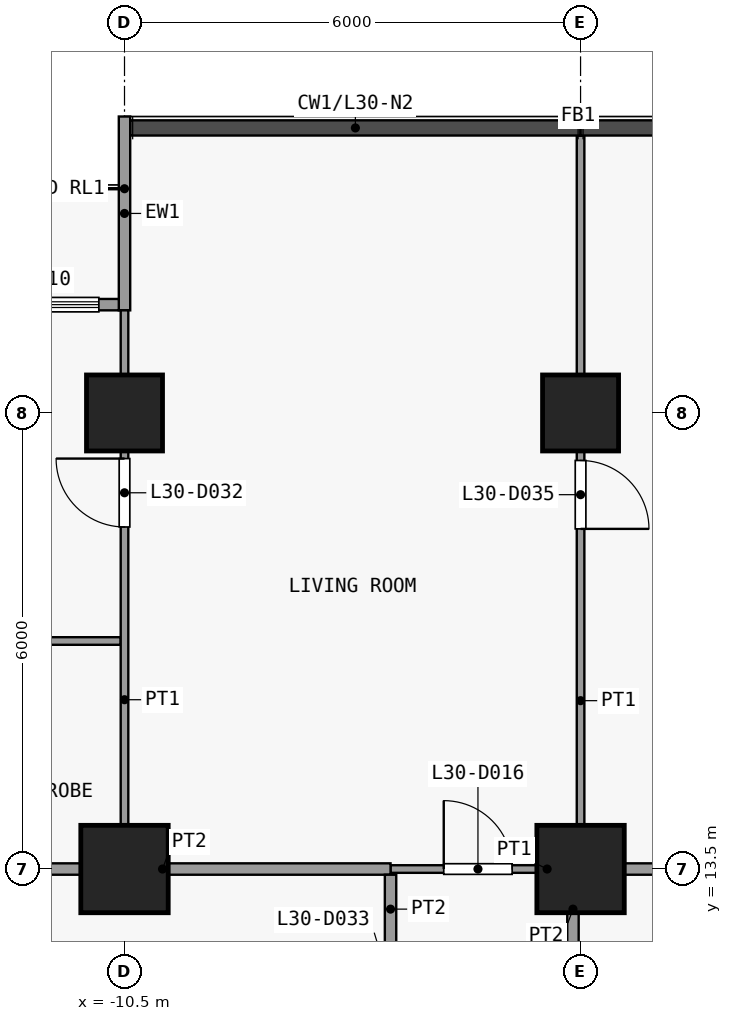
"""IFC4 building model, lengths in metres.
Left out: names, types, materials, properties, quantities, classifications, styles, units other than length and angle.
Written with IfcOpenShell. Run it as: python <this file> out.ifc"""

import sys

from ifc_helpers import new_model, si_unit, direction, frame, frame_2d, origin, origin_2d, place, context, subcontext, project, spatial, rectangle, extrude, element, fill, save


model = new_model("IFC4")
c1 = context("Model", 3, precision=1e-05, world=origin(), true_north=direction((0.0, 1.0)))
c2 = subcontext(c1, "Body", "Model", "MODEL_VIEW")
j1 = project(units=[si_unit("LENGTHUNIT", "METRE"), si_unit("PLANEANGLEUNIT", "RADIAN")], contexts=[c1])
p1 = place(None, origin())
s1 = spatial("IfcSite", under=j1, at=p1, CompositionType="ELEMENT")
p2 = place(p1, origin())
s2 = spatial("IfcBuilding", under=s1, at=p2, CompositionType="ELEMENT")
p3 = place(p2, frame((0.0, 0.0, 120.7)))
s3 = spatial("IfcBuildingStorey", under=s2, at=p3, CompositionType="ELEMENT", Elevation=120.7)
p4 = place(p3, frame((-10.5, 13.5, 0.0), z_axis=(0.0, 0.0, 1.0), x_axis=(1.0, 0.0, 0.0)))
e1 = element("IfcColumn", 1, at=p4, inside=s3, PredefinedType="COLUMN", context=c2, shape_type="SweptSolid", body=[
    extrude(rectangle(XDim=1.15, YDim=1.15, at=origin_2d()), origin(), (0.0, 0.0, 1.0), 3.6),
])
p5 = place(p3, frame((-10.5, 19.5, 0.0), z_axis=(0.0, 0.0, 1.0), x_axis=(1.0, 0.0, 0.0)))
e2 = element("IfcColumn", 2, at=p5, inside=s3, PredefinedType="COLUMN", context=c2, shape_type="SweptSolid", body=[
    extrude(rectangle(XDim=1.0, YDim=1.0, at=origin_2d()), origin(), (0.0, 0.0, 1.0), 3.6),
])
p6 = place(p3, frame((-4.5, 13.5, 0.0), z_axis=(0.0, 0.0, 1.0), x_axis=(1.0, 0.0, 0.0)))
e3 = element("IfcColumn", 3, at=p6, inside=s3, PredefinedType="COLUMN", context=c2, shape_type="SweptSolid", body=[
    extrude(rectangle(XDim=1.15, YDim=1.15, at=origin_2d()), origin(), (0.0, 0.0, 1.0), 3.6),
])
p7 = place(p3, frame((-4.5, 19.5, 0.0), z_axis=(0.0, 0.0, 1.0), x_axis=(1.0, 0.0, 0.0)))
e4 = element("IfcColumn", 4, at=p7, inside=s3, PredefinedType="COLUMN", context=c2, shape_type="SweptSolid", body=[
    extrude(rectangle(XDim=1.0, YDim=1.0, at=origin_2d()), origin(), (0.0, 0.0, 1.0), 3.6),
])
p8 = place(p3, frame((-10.5, 20.85, 0.0), z_axis=(0.0, 0.0, 1.0), x_axis=(0.0, 1.0, 0.0)))
e5 = element("IfcWall", 5, at=p8, inside=s3, PredefinedType="SOLIDWALL", context=c2, shape_type="SweptSolid", body=[
    extrude(rectangle(XDim=2.55, YDim=0.15, at=frame_2d((1.275, 0.0))), origin(), (0.0, 0.0, 1.0), 3.3),
])
p9 = place(p3, frame((-16.425, 20.925, 0.0), z_axis=(0.0, 0.0, 1.0), x_axis=(1.0, 0.0, 0.0)))
e6 = element("IfcWall", 6, at=p9, inside=s3, PredefinedType="SOLIDWALL", context=c2, shape_type="SweptSolid", body=[
    extrude(rectangle(XDim=5.85, YDim=0.15, at=frame_2d((2.925, 0.0))), origin(), (0.0, 0.0, 1.0), 3.3),
])
p10 = place(p9, frame((2.325, 0.0, 0.0)))
e7 = element("IfcOpeningElement", 7, at=p10, cuts=e6, PredefinedType="OPENING", context=c2, shape_type="SweptSolid", body=[
    extrude(rectangle(XDim=1.2, YDim=2.4, at=frame_2d((0.6, 1.2))), frame((0.0, 0.085, 0.0), z_axis=(0.0, -1.0, 0.0), x_axis=(1.0, 0.0, 0.0)), (0.0, 0.0, 1.0), 0.17),
])
p11 = place(p9, frame((0.262, 0.0, 0.9)))
e8 = element("IfcOpeningElement", 8, at=p11, cuts=e6, PredefinedType="OPENING", context=c2, shape_type="SweptSolid", body=[
    extrude(rectangle(XDim=1.8, YDim=2.1, at=frame_2d((0.9, 1.05))), frame((0.0, 0.085, 0.0), z_axis=(0.0, -1.0, 0.0), x_axis=(1.0, 0.0, 0.0)), (0.0, 0.0, 1.0), 0.17),
])
p12 = place(p9, frame((3.788, 0.0, 0.9)))
e9 = element("IfcOpeningElement", 9, at=p12, cuts=e6, PredefinedType="OPENING", context=c2, shape_type="SweptSolid", body=[
    extrude(rectangle(XDim=1.8, YDim=2.1, at=frame_2d((0.9, 1.05))), frame((0.0, 0.085, 0.0), z_axis=(0.0, -1.0, 0.0), x_axis=(1.0, 0.0, 0.0)), (0.0, 0.0, 1.0), 0.17),
])
p13 = place(p3, frame((-7.0, 13.5, 0.0), z_axis=(0.0, 0.0, 1.0), x_axis=(1.0, 0.0, 0.0)))
e10 = element("IfcWall", 10, at=p13, inside=s3, PredefinedType="PARTITIONING", context=c2, shape_type="SweptSolid", body=[
    extrude(rectangle(XDim=2.4, YDim=0.1, at=frame_2d((1.2, 0.0))), origin(), (0.0, 0.0, 1.0), 3.3),
])
p14 = place(p13, frame((0.7, 0.0, 0.0)))
e11 = element("IfcOpeningElement", 11, at=p14, cuts=e10, PredefinedType="OPENING", context=c2, shape_type="SweptSolid", body=[
    extrude(rectangle(XDim=0.9, YDim=2.1, at=frame_2d((0.45, 1.05))), frame((0.0, 0.06, 0.0), z_axis=(0.0, -1.0, 0.0), x_axis=(1.0, 0.0, 0.0)), (0.0, 0.0, 1.0), 0.12),
])
p15 = place(p3, frame((-13.0, 13.5, 0.0), z_axis=(0.0, 0.0, 1.0), x_axis=(1.0, 0.0, 0.0)))
e12 = element("IfcWall", 12, at=p15, inside=s3, PredefinedType="PARTITIONING", context=c2, shape_type="SweptSolid", body=[
    extrude(rectangle(XDim=6.0, YDim=0.15, at=frame_2d((3.0, 0.0))), origin(), (0.0, 0.0, 1.0), 3.3),
])
p16 = place(p3, frame((-4.5, 13.5, 0.0), z_axis=(0.0, 0.0, 1.0), x_axis=(1.0, 0.0, 0.0)))
e13 = element("IfcWall", 13, at=p16, inside=s3, PredefinedType="PARTITIONING", context=c2, shape_type="SweptSolid", body=[
    extrude(rectangle(XDim=7.4, YDim=0.15, at=frame_2d((3.7, 0.0))), origin(), (0.0, 0.0, 1.0), 3.3),
])
p17 = place(p3, frame((-13.8, 16.5, 0.0), z_axis=(0.0, 0.0, 1.0), x_axis=(1.0, 0.0, 0.0)))
e14 = element("IfcWall", 14, at=p17, inside=s3, PredefinedType="PARTITIONING", context=c2, shape_type="SweptSolid", body=[
    extrude(rectangle(XDim=3.25, YDim=0.1, at=frame_2d((1.625, 0.0))), origin(), (0.0, 0.0, 1.0), 3.3),
])
p18 = place(p17, frame((1.2, 0.0, 0.0)))
e15 = element("IfcOpeningElement", 15, at=p18, cuts=e14, PredefinedType="OPENING", context=c2, shape_type="SweptSolid", body=[
    extrude(rectangle(XDim=0.9, YDim=2.1, at=frame_2d((0.45, 1.05))), frame((0.0, 0.06, 0.0), z_axis=(0.0, -1.0, 0.0), x_axis=(1.0, 0.0, 0.0)), (0.0, 0.0, 1.0), 0.12),
])
p19 = place(p3, frame((-10.5, 13.575, 0.0), z_axis=(0.0, 0.0, 1.0), x_axis=(0.0, 1.0, 0.0)))
e16 = element("IfcWall", 16, at=p19, inside=s3, PredefinedType="PARTITIONING", context=c2, shape_type="SweptSolid", body=[
    extrude(rectangle(XDim=7.275, YDim=0.1, at=frame_2d((3.638, 0.0))), origin(), (0.0, 0.0, 1.0), 3.3),
])
p20 = place(p19, frame((4.425, 0.0, 0.0)))
e17 = element("IfcOpeningElement", 17, at=p20, cuts=e16, PredefinedType="OPENING", context=c2, shape_type="SweptSolid", body=[
    extrude(rectangle(XDim=0.9, YDim=2.1, at=frame_2d((0.45, 1.05))), frame((0.0, 0.06, 0.0), z_axis=(0.0, -1.0, 0.0), x_axis=(1.0, 0.0, 0.0)), (0.0, 0.0, 1.0), 0.12),
])
p21 = place(p3, frame((-7.0, 10.6, 0.0), z_axis=(0.0, 0.0, 1.0), x_axis=(0.0, 1.0, 0.0)))
e18 = element("IfcWall", 18, at=p21, inside=s3, PredefinedType="PARTITIONING", context=c2, shape_type="SweptSolid", body=[
    extrude(rectangle(XDim=2.825, YDim=0.15, at=frame_2d((1.413, 0.0))), origin(), (0.0, 0.0, 1.0), 3.3),
])
p22 = place(p21, frame((0.9, 0.0, 0.0)))
e19 = element("IfcOpeningElement", 19, at=p22, cuts=e18, PredefinedType="OPENING", context=c2, shape_type="SweptSolid", body=[
    extrude(rectangle(XDim=0.9, YDim=2.1, at=frame_2d((0.45, 1.05))), frame((0.0, 0.085, 0.0), z_axis=(0.0, -1.0, 0.0), x_axis=(1.0, 0.0, 0.0)), (0.0, 0.0, 1.0), 0.17),
])
p23 = place(p3, frame((-4.6, 10.6, 0.0), z_axis=(0.0, 0.0, 1.0), x_axis=(0.0, 1.0, 0.0)))
e20 = element("IfcWall", 20, at=p23, inside=s3, PredefinedType="PARTITIONING", context=c2, shape_type="SweptSolid", body=[
    extrude(rectangle(XDim=2.825, YDim=0.15, at=frame_2d((1.413, 0.0))), origin(), (0.0, 0.0, 1.0), 3.3),
])
p24 = place(p23, frame((0.9, 0.0, 0.0)))
e21 = element("IfcOpeningElement", 21, at=p24, cuts=e20, PredefinedType="OPENING", context=c2, shape_type="SweptSolid", body=[
    extrude(rectangle(XDim=0.9, YDim=2.1, at=frame_2d((0.45, 1.05))), frame((0.0, 0.085, 0.0), z_axis=(0.0, -1.0, 0.0), x_axis=(1.0, 0.0, 0.0)), (0.0, 0.0, 1.0), 0.17),
])
p25 = place(p3, frame((-4.5, 13.575, 0.0), z_axis=(0.0, 0.0, 1.0), x_axis=(0.0, 1.0, 0.0)))
e22 = element("IfcWall", 22, at=p25, inside=s3, PredefinedType="PARTITIONING", context=c2, shape_type="SweptSolid", body=[
    extrude(rectangle(XDim=9.575, YDim=0.1, at=frame_2d((4.788, 0.0))), origin(), (0.0, 0.0, 1.0), 3.3),
])
p26 = place(p25, frame((4.4, 0.0, 0.0)))
e23 = element("IfcOpeningElement", 23, at=p26, cuts=e22, PredefinedType="OPENING", context=c2, shape_type="SweptSolid", body=[
    extrude(rectangle(XDim=0.9, YDim=2.1, at=frame_2d((0.45, 1.05))), frame((0.0, 0.06, 0.0), z_axis=(0.0, -1.0, 0.0), x_axis=(1.0, 0.0, 0.0)), (0.0, 0.0, 1.0), 0.12),
])
p27 = place(p12, origin())
e24 = element("IfcWindow", 24, at=p27, inside=s3, PartitioningType="SINGLE_PANEL", PredefinedType="WINDOW", context=c2, shape_type="SweptSolid", body=[
    extrude(rectangle(XDim=1.8, YDim=2.1, at=frame_2d((0.9, 1.05))), frame((0.0, 0.03, 0.0), z_axis=(0.0, -1.0, 0.0), x_axis=(1.0, 0.0, 0.0)), (0.0, 0.0, 1.0), 0.06),
])
fill(e9, e24)
p28 = place(p14, origin())
e25 = element("IfcDoor", 25, at=p28, inside=s3, OperationType="SINGLE_SWING_RIGHT", PredefinedType="DOOR", context=c2, shape_type="SweptSolid", body=[
    extrude(rectangle(XDim=0.9, YDim=2.1, at=frame_2d((0.45, 1.05))), frame((0.0, 0.025, 0.0), z_axis=(0.0, -1.0, 0.0), x_axis=(1.0, 0.0, 0.0)), (0.0, 0.0, 1.0), 0.05),
])
fill(e11, e25)
p29 = place(p20, origin())
e26 = element("IfcDoor", 26, at=p29, inside=s3, OperationType="SINGLE_SWING_LEFT", PredefinedType="DOOR", context=c2, shape_type="SweptSolid", body=[
    extrude(rectangle(XDim=0.9, YDim=2.1, at=frame_2d((0.45, 1.05))), frame((0.0, 0.025, 0.0), z_axis=(0.0, -1.0, 0.0), x_axis=(1.0, 0.0, 0.0)), (0.0, 0.0, 1.0), 0.05),
])
fill(e17, e26)
p30 = place(p26, origin())
e27 = element("IfcDoor", 27, at=p30, inside=s3, OperationType="SINGLE_SWING_LEFT", PredefinedType="DOOR", context=c2, shape_type="SweptSolid", body=[
    extrude(rectangle(XDim=0.9, YDim=2.1, at=frame_2d((0.45, 1.05))), frame((0.0, 0.025, 0.0), z_axis=(0.0, -1.0, 0.0), x_axis=(1.0, 0.0, 0.0)), (0.0, 0.0, 1.0), 0.05),
])
fill(e23, e27)
save(model, sys.argv[1])
